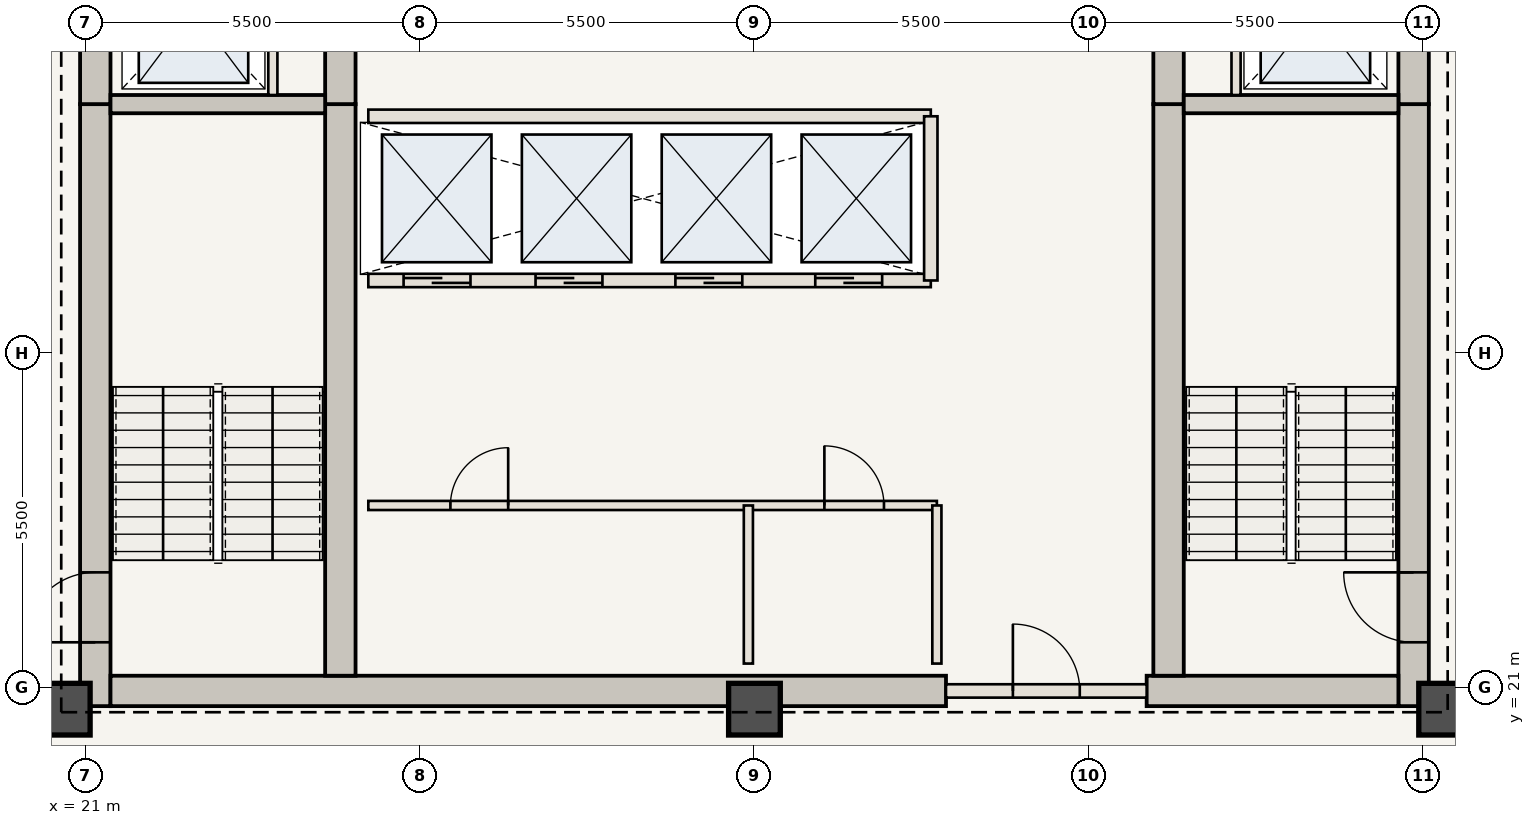
"""IFC4 building model, lengths in metres.
Left out: names, types, materials, properties, quantities, classifications, styles, units other than length and angle.
Written with IfcOpenShell. Run it as: python <this file> out.ifc"""

import sys

from ifc_helpers import new_model, si_unit, direction, frame, frame_2d, origin, origin_2d, place, context, subcontext, project, spatial, rectangle, extrude, element, fill, save


model = new_model("IFC4")
c1 = context("Model", 3, precision=1e-05, world=origin(), true_north=direction((0.0, 1.0)))
c2 = subcontext(c1, "Body", "Model", "MODEL_VIEW")
j1 = project(units=[si_unit("LENGTHUNIT", "METRE"), si_unit("PLANEANGLEUNIT", "RADIAN")], contexts=[c1])
p1 = place(None, origin())
s1 = spatial("IfcSite", under=j1, at=p1, CompositionType="ELEMENT")
p2 = place(p1, origin())
s2 = spatial("IfcBuilding", under=s1, at=p2, CompositionType="ELEMENT")
p3 = place(p2, frame((0.0, 0.0, 240.8)))
s3 = spatial("IfcBuildingStorey", under=s2, at=p3, CompositionType="ELEMENT", Elevation=240.8)
p4 = place(p3, frame((21.16, 20.7, 0.0), z_axis=(0.0, 0.0, 1.0), x_axis=(0.0, 1.0, 0.0)))
e1 = element("IfcWall", 1, at=p4, inside=s3, PredefinedType="SHEAR", context=c2, shape_type="SweptSolid", body=[
    extrude(rectangle(XDim=9.9, YDim=0.5, at=frame_2d((4.95, 0.0))), origin(), (0.0, 0.0, 1.0), 3.85),
])
p5 = place(p4, frame((1.05, 0.0, 0.0)))
e2 = element("IfcOpeningElement", 2, at=p5, cuts=e1, PredefinedType="OPENING", context=c2, shape_type="SweptSolid", body=[
    extrude(rectangle(XDim=1.15, YDim=2.15, at=frame_2d((0.575, 1.075))), frame((0.0, 0.26, 0.0), z_axis=(0.0, -1.0, 0.0), x_axis=(1.0, 0.0, 0.0)), (0.0, 0.0, 1.0), 0.52),
])
p6 = place(p3, frame((21.16, 30.6, 0.0), z_axis=(0.0, 0.0, 1.0), x_axis=(0.0, 1.0, 0.0)))
e3 = element("IfcWall", 3, at=p6, inside=s3, PredefinedType="SHEAR", context=c2, shape_type="SweptSolid", body=[
    extrude(rectangle(XDim=12.65, YDim=0.5, at=frame_2d((6.325, 0.0))), origin(), (0.0, 0.0, 1.0), 3.85),
])
p7 = place(p6, frame((4.2, 0.0, 0.0)))
e4 = element("IfcOpeningElement", 4, at=p7, cuts=e3, PredefinedType="OPENING", context=c2, shape_type="SweptSolid", body=[
    extrude(rectangle(XDim=1.1, YDim=2.15, at=frame_2d((0.55, 1.075))), frame((0.0, 0.26, 0.0), z_axis=(0.0, -1.0, 0.0), x_axis=(1.0, 0.0, 0.0)), (0.0, 0.0, 1.0), 0.52),
])
p8 = place(p6, frame((8.05, 0.0, 0.0)))
e5 = element("IfcOpeningElement", 5, at=p8, cuts=e3, PredefinedType="OPENING", context=c2, shape_type="SweptSolid", body=[
    extrude(rectangle(XDim=0.92, YDim=2.1, at=frame_2d((0.46, 1.05))), frame((0.0, 0.26, 0.0), z_axis=(0.0, -1.0, 0.0), x_axis=(1.0, 0.0, 0.0)), (0.0, 0.0, 1.0), 0.52),
])
p9 = place(p6, frame((9.45, 0.0, 0.0)))
e6 = element("IfcOpeningElement", 6, at=p9, cuts=e3, PredefinedType="OPENING", context=c2, shape_type="SweptSolid", body=[
    extrude(rectangle(XDim=0.88, YDim=2.1, at=frame_2d((0.44, 1.05))), frame((0.0, 0.26, 0.0), z_axis=(0.0, -1.0, 0.0), x_axis=(1.0, 0.0, 0.0)), (0.0, 0.0, 1.0), 0.52),
])
p10 = place(p6, frame((10.85, 0.0, 0.0)))
e7 = element("IfcOpeningElement", 7, at=p10, cuts=e3, PredefinedType="OPENING", context=c2, shape_type="SweptSolid", body=[
    extrude(rectangle(XDim=0.88, YDim=2.1, at=frame_2d((0.44, 1.05))), frame((0.0, 0.26, 0.0), z_axis=(0.0, -1.0, 0.0), x_axis=(1.0, 0.0, 0.0)), (0.0, 0.0, 1.0), 0.52),
])
p11 = place(p3, frame((42.84, 20.7, 0.0), z_axis=(0.0, 0.0, 1.0), x_axis=(0.0, 1.0, 0.0)))
e8 = element("IfcWall", 8, at=p11, inside=s3, PredefinedType="SHEAR", context=c2, shape_type="SweptSolid", body=[
    extrude(rectangle(XDim=9.9, YDim=0.5, at=frame_2d((4.95, 0.0))), origin(), (0.0, 0.0, 1.0), 3.85),
])
p12 = place(p11, frame((1.05, 0.0, 0.0)))
e9 = element("IfcOpeningElement", 9, at=p12, cuts=e8, PredefinedType="OPENING", context=c2, shape_type="SweptSolid", body=[
    extrude(rectangle(XDim=1.15, YDim=2.15, at=frame_2d((0.575, 1.075))), frame((0.0, 0.26, 0.0), z_axis=(0.0, -1.0, 0.0), x_axis=(1.0, 0.0, 0.0)), (0.0, 0.0, 1.0), 0.52),
])
p13 = place(p3, frame((42.84, 30.6, 0.0), z_axis=(0.0, 0.0, 1.0), x_axis=(0.0, 1.0, 0.0)))
e10 = element("IfcWall", 10, at=p13, inside=s3, PredefinedType="SHEAR", context=c2, shape_type="SweptSolid", body=[
    extrude(rectangle(XDim=12.65, YDim=0.5, at=frame_2d((6.325, 0.0))), origin(), (0.0, 0.0, 1.0), 3.85),
])
p14 = place(p13, frame((4.2, 0.0, 0.0)))
e11 = element("IfcOpeningElement", 11, at=p14, cuts=e10, PredefinedType="OPENING", context=c2, shape_type="SweptSolid", body=[
    extrude(rectangle(XDim=1.1, YDim=2.15, at=frame_2d((0.55, 1.075))), frame((0.0, 0.26, 0.0), z_axis=(0.0, -1.0, 0.0), x_axis=(1.0, 0.0, 0.0)), (0.0, 0.0, 1.0), 0.52),
])
p15 = place(p13, frame((9.2, 0.0, 0.0)))
e12 = element("IfcOpeningElement", 12, at=p15, cuts=e10, PredefinedType="OPENING", context=c2, shape_type="SweptSolid", body=[
    extrude(rectangle(XDim=0.92, YDim=2.1, at=frame_2d((0.46, 1.05))), frame((0.0, 0.26, 0.0), z_axis=(0.0, -1.0, 0.0), x_axis=(1.0, 0.0, 0.0)), (0.0, 0.0, 1.0), 0.52),
])
p16 = place(p3, frame((21.41, 20.95, 0.0), z_axis=(0.0, 0.0, 1.0), x_axis=(1.0, 0.0, 0.0)))
e13 = element("IfcWall", 13, at=p16, inside=s3, PredefinedType="SHEAR", context=c2, shape_type="SweptSolid", body=[
    extrude(rectangle(XDim=13.74, YDim=0.5, at=frame_2d((6.87, 0.0))), origin(), (0.0, 0.0, 1.0), 3.85),
])
p17 = place(p3, frame((38.45, 20.95, 0.0), z_axis=(0.0, 0.0, 1.0), x_axis=(1.0, 0.0, 0.0)))
e14 = element("IfcWall", 14, at=p17, inside=s3, PredefinedType="SHEAR", context=c2, shape_type="SweptSolid", body=[
    extrude(rectangle(XDim=4.14, YDim=0.5, at=frame_2d((2.07, 0.0))), origin(), (0.0, 0.0, 1.0), 3.85),
])
p18 = place(p3, frame((25.19, 21.2, 0.0), z_axis=(0.0, 0.0, 1.0), x_axis=(0.0, 1.0, 0.0)))
e15 = element("IfcWall", 15, at=p18, inside=s3, PredefinedType="SHEAR", context=c2, shape_type="SweptSolid", body=[
    extrude(rectangle(XDim=9.4, YDim=0.5, at=frame_2d((4.7, 0.0))), origin(), (0.0, 0.0, 1.0), 3.85),
])
p19 = place(p3, frame((25.19, 30.6, 0.0), z_axis=(0.0, 0.0, 1.0), x_axis=(0.0, 1.0, 0.0)))
e16 = element("IfcWall", 16, at=p19, inside=s3, PredefinedType="SHEAR", context=c2, shape_type="SweptSolid", body=[
    extrude(rectangle(XDim=12.15, YDim=0.5, at=frame_2d((6.075, 0.0))), origin(), (0.0, 0.0, 1.0), 3.85),
])
p20 = place(p19, frame((6.25, 0.0, 0.0)))
e17 = element("IfcOpeningElement", 17, at=p20, cuts=e16, PredefinedType="OPENING", context=c2, shape_type="SweptSolid", body=[
    extrude(rectangle(XDim=1.1, YDim=2.15, at=frame_2d((0.55, 1.075))), frame((0.0, 0.26, 0.0), z_axis=(0.0, -1.0, 0.0), x_axis=(1.0, 0.0, 0.0)), (0.0, 0.0, 1.0), 0.52),
])
p21 = place(p3, frame((38.81, 21.2, 0.0), z_axis=(0.0, 0.0, 1.0), x_axis=(0.0, 1.0, 0.0)))
e18 = element("IfcWall", 18, at=p21, inside=s3, PredefinedType="SHEAR", context=c2, shape_type="SweptSolid", body=[
    extrude(rectangle(XDim=9.4, YDim=0.5, at=frame_2d((4.7, 0.0))), origin(), (0.0, 0.0, 1.0), 3.85),
])
p22 = place(p3, frame((38.81, 30.6, 0.0), z_axis=(0.0, 0.0, 1.0), x_axis=(0.0, 1.0, 0.0)))
e19 = element("IfcWall", 19, at=p22, inside=s3, PredefinedType="SHEAR", context=c2, shape_type="SweptSolid", body=[
    extrude(rectangle(XDim=12.15, YDim=0.5, at=frame_2d((6.075, 0.0))), origin(), (0.0, 0.0, 1.0), 3.85),
])
for number, where, z_axis, x_axis in (
    (20, (20.65, 20.65, 0.0), (0.0, 0.0, 1.0), (1.0, 0.0, 0.0)),
    (21, (32.0, 20.65, 0.0), (0.0, 0.0, 1.0), (1.0, 0.0, 0.0)),
    (22, (43.35, 20.65, 0.0), (0.0, 0.0, 1.0), (1.0, 0.0, 0.0)),
):
    element("IfcColumn", number, at=place(p3, frame(where, z_axis=z_axis, x_axis=x_axis)), inside=s3, PredefinedType="COLUMN", context=c2, shape_type="SweptSolid", body=[
        extrude(rectangle(XDim=0.85, YDim=0.85, at=origin_2d()), origin(), (0.0, 0.0, 1.0), 3.85),
    ])
for number, where, z_axis, x_axis in (
    (23, (21.41, 30.6, 0.0), (0.0, 0.0, 1.0), (1.0, 0.0, 0.0)),
    (24, (39.06, 30.6, 0.0), (0.0, 0.0, 1.0), (1.0, 0.0, 0.0)),
):
    element("IfcWall", number, at=place(p3, frame(where, z_axis=z_axis, x_axis=x_axis)), inside=s3, PredefinedType="SHEAR", context=c2, shape_type="SweptSolid", body=[
        extrude(rectangle(XDim=3.53, YDim=0.3, at=frame_2d((1.765, 0.0))), origin(), (0.0, 0.0, 1.0), 3.685),
    ])
for number, where, z_axis, x_axis in (
    (25, (24.08, 30.75, 0.0), (0.0, 0.0, 1.0), (0.0, 1.0, 0.0)),
    (26, (39.92, 30.75, 0.0), (0.0, 0.0, 1.0), (0.0, 1.0, 0.0)),
):
    element("IfcWall", number, at=place(p3, frame(where, z_axis=z_axis, x_axis=x_axis)), inside=s3, PredefinedType="STANDARD", context=c2, shape_type="SweptSolid", body=[
        extrude(rectangle(XDim=2.65, YDim=0.15, at=frame_2d((1.325, 0.0))), origin(), (0.0, 0.0, 1.0), 3.685),
    ])
p23 = place(p3, frame((35.15, 20.95, 0.0), z_axis=(0.0, 0.0, 1.0), x_axis=(1.0, 0.0, 0.0)))
e27 = element("IfcWall", 27, at=p23, inside=s3, PredefinedType="STANDARD", context=c2, shape_type="SweptSolid", body=[
    extrude(rectangle(XDim=3.3, YDim=0.22, at=frame_2d((1.65, 0.0))), origin(), (0.0, 0.0, 1.0), 3.685),
])
p24 = place(p23, frame((1.1, 0.0, 0.0)))
e28 = element("IfcOpeningElement", 28, at=p24, cuts=e27, PredefinedType="OPENING", context=c2, shape_type="SweptSolid", body=[
    extrude(rectangle(XDim=1.1, YDim=2.15, at=frame_2d((0.55, 1.075))), frame((0.0, 0.12, 0.0), z_axis=(0.0, -1.0, 0.0), x_axis=(1.0, 0.0, 0.0)), (0.0, 0.0, 1.0), 0.24),
])
p25 = place(p3, frame((25.65, 24.0, 0.0), z_axis=(0.0, 0.0, 1.0), x_axis=(1.0, 0.0, 0.0)))
e29 = element("IfcWall", 29, at=p25, inside=s3, PredefinedType="STANDARD", context=c2, shape_type="SweptSolid", body=[
    extrude(rectangle(XDim=9.35, YDim=0.15, at=frame_2d((4.675, 0.0))), origin(), (0.0, 0.0, 1.0), 3.685),
])
p26 = place(p25, frame((1.35, 0.0, 0.0)))
e30 = element("IfcOpeningElement", 30, at=p26, cuts=e29, PredefinedType="OPENING", context=c2, shape_type="SweptSolid", body=[
    extrude(rectangle(XDim=0.95, YDim=2.15, at=frame_2d((0.475, 1.075))), frame((0.0, 0.085, 0.0), z_axis=(0.0, -1.0, 0.0), x_axis=(1.0, 0.0, 0.0)), (0.0, 0.0, 1.0), 0.17),
])
p27 = place(p25, frame((7.5, 0.0, 0.0)))
e31 = element("IfcOpeningElement", 31, at=p27, cuts=e29, PredefinedType="OPENING", context=c2, shape_type="SweptSolid", body=[
    extrude(rectangle(XDim=0.98, YDim=2.2, at=frame_2d((0.49, 1.1))), frame((0.0, 0.085, 0.0), z_axis=(0.0, -1.0, 0.0), x_axis=(1.0, 0.0, 0.0)), (0.0, 0.0, 1.0), 0.17),
])
for number, where, z_axis, x_axis in (
    (32, (31.9, 21.4, 0.0), (0.0, 0.0, 1.0), (0.0, 1.0, 0.0)),
    (33, (35.0, 21.4, 0.0), (0.0, 0.0, 1.0), (0.0, 1.0, 0.0)),
):
    element("IfcWall", number, at=place(p3, frame(where, z_axis=z_axis, x_axis=x_axis)), inside=s3, PredefinedType="STANDARD", context=c2, shape_type="SweptSolid", body=[
        extrude(rectangle(XDim=2.6, YDim=0.15, at=frame_2d((1.3, 0.0))), origin(), (0.0, 0.0, 1.0), 3.685),
    ])
p28 = place(p3, frame((25.65, 27.7, 0.0), z_axis=(0.0, 0.0, 1.0), x_axis=(1.0, 0.0, 0.0)))
e34 = element("IfcWall", 34, at=p28, inside=s3, PredefinedType="STANDARD", context=c2, shape_type="SweptSolid", body=[
    extrude(rectangle(XDim=9.25, YDim=0.22, at=frame_2d((4.625, 0.0))), origin(), (0.0, 0.0, 1.0), 3.685),
])
p29 = place(p28, frame((0.58, 0.0, 0.0)))
e35 = element("IfcOpeningElement", 35, at=p29, cuts=e34, PredefinedType="OPENING", context=c2, shape_type="SweptSolid", body=[
    extrude(rectangle(XDim=1.1, YDim=2.15, at=frame_2d((0.55, 1.075))), frame((0.0, 0.12, 0.0), z_axis=(0.0, -1.0, 0.0), x_axis=(1.0, 0.0, 0.0)), (0.0, 0.0, 1.0), 0.24),
])
p30 = place(p28, frame((2.75, 0.0, 0.0)))
e36 = element("IfcOpeningElement", 36, at=p30, cuts=e34, PredefinedType="OPENING", context=c2, shape_type="SweptSolid", body=[
    extrude(rectangle(XDim=1.1, YDim=2.15, at=frame_2d((0.55, 1.075))), frame((0.0, 0.12, 0.0), z_axis=(0.0, -1.0, 0.0), x_axis=(1.0, 0.0, 0.0)), (0.0, 0.0, 1.0), 0.24),
])
p31 = place(p28, frame((5.05, 0.0, 0.0)))
e37 = element("IfcOpeningElement", 37, at=p31, cuts=e34, PredefinedType="OPENING", context=c2, shape_type="SweptSolid", body=[
    extrude(rectangle(XDim=1.1, YDim=2.15, at=frame_2d((0.55, 1.075))), frame((0.0, 0.12, 0.0), z_axis=(0.0, -1.0, 0.0), x_axis=(1.0, 0.0, 0.0)), (0.0, 0.0, 1.0), 0.24),
])
p32 = place(p28, frame((7.35, 0.0, 0.0)))
e38 = element("IfcOpeningElement", 38, at=p32, cuts=e34, PredefinedType="OPENING", context=c2, shape_type="SweptSolid", body=[
    extrude(rectangle(XDim=1.1, YDim=2.15, at=frame_2d((0.55, 1.075))), frame((0.0, 0.12, 0.0), z_axis=(0.0, -1.0, 0.0), x_axis=(1.0, 0.0, 0.0)), (0.0, 0.0, 1.0), 0.24),
])
p33 = place(p3, frame((25.65, 30.4, 0.0), z_axis=(0.0, 0.0, 1.0), x_axis=(1.0, 0.0, 0.0)))
e39 = element("IfcWall", 39, at=p33, inside=s3, PredefinedType="STANDARD", context=c2, shape_type="SweptSolid", body=[
    extrude(rectangle(XDim=9.25, YDim=0.22, at=frame_2d((4.625, 0.0))), origin(), (0.0, 0.0, 1.0), 3.685),
])
p34 = place(p3, frame((34.9, 27.7, 0.0), z_axis=(0.0, 0.0, 1.0), x_axis=(0.0, 1.0, 0.0)))
e40 = element("IfcWall", 40, at=p34, inside=s3, PredefinedType="STANDARD", context=c2, shape_type="SweptSolid", body=[
    extrude(rectangle(XDim=2.7, YDim=0.22, at=frame_2d((1.35, 0.0))), origin(), (0.0, 0.0, 1.0), 3.685),
])
p35 = place(p5, origin())
e41 = element("IfcDoor", 41, at=p35, inside=s3, OperationType="SINGLE_SWING_LEFT", PredefinedType="DOOR", context=c2, shape_type="SweptSolid", body=[
    extrude(rectangle(XDim=1.15, YDim=2.15, at=frame_2d((0.575, 1.075))), frame((0.0, 0.025, 0.0), z_axis=(0.0, -1.0, 0.0), x_axis=(1.0, 0.0, 0.0)), (0.0, 0.0, 1.0), 0.05),
])
fill(e2, e41)
p36 = place(p12, origin())
e42 = element("IfcDoor", 42, at=p36, inside=s3, OperationType="SINGLE_SWING_RIGHT", PredefinedType="DOOR", context=c2, shape_type="SweptSolid", body=[
    extrude(rectangle(XDim=1.15, YDim=2.15, at=frame_2d((0.575, 1.075))), frame((0.0, 0.025, 0.0), z_axis=(0.0, -1.0, 0.0), x_axis=(1.0, 0.0, 0.0)), (0.0, 0.0, 1.0), 0.05),
])
fill(e9, e42)
p37 = place(p24, origin())
e43 = element("IfcDoor", 43, at=p37, inside=s3, OperationType="SINGLE_SWING_LEFT", PredefinedType="DOOR", context=c2, shape_type="SweptSolid", body=[
    extrude(rectangle(XDim=1.1, YDim=2.15, at=frame_2d((0.55, 1.075))), frame((0.0, 0.025, 0.0), z_axis=(0.0, -1.0, 0.0), x_axis=(1.0, 0.0, 0.0)), (0.0, 0.0, 1.0), 0.05),
])
fill(e28, e43)
p38 = place(p26, origin())
e44 = element("IfcDoor", 44, at=p38, inside=s3, OperationType="SINGLE_SWING_RIGHT", PredefinedType="DOOR", context=c2, shape_type="SweptSolid", body=[
    extrude(rectangle(XDim=0.95, YDim=2.15, at=frame_2d((0.475, 1.075))), frame((0.0, 0.025, 0.0), z_axis=(0.0, -1.0, 0.0), x_axis=(1.0, 0.0, 0.0)), (0.0, 0.0, 1.0), 0.05),
])
fill(e30, e44)
p39 = place(p27, origin())
e45 = element("IfcDoor", 45, at=p39, inside=s3, OperationType="SINGLE_SWING_LEFT", PredefinedType="DOOR", context=c2, shape_type="SweptSolid", body=[
    extrude(rectangle(XDim=0.98, YDim=2.2, at=frame_2d((0.49, 1.1))), frame((0.0, 0.025, 0.0), z_axis=(0.0, -1.0, 0.0), x_axis=(1.0, 0.0, 0.0)), (0.0, 0.0, 1.0), 0.05),
])
fill(e31, e45)
p40 = place(p29, origin())
e46 = element("IfcDoor", 46, at=p40, inside=s3, OperationType="DOUBLE_DOOR_SLIDING", PredefinedType="DOOR", context=c2, shape_type="SweptSolid", body=[
    extrude(rectangle(XDim=1.1, YDim=2.15, at=frame_2d((0.55, 1.075))), frame((0.0, 0.025, 0.0), z_axis=(0.0, -1.0, 0.0), x_axis=(1.0, 0.0, 0.0)), (0.0, 0.0, 1.0), 0.05),
])
fill(e35, e46)
p41 = place(p30, origin())
e47 = element("IfcDoor", 47, at=p41, inside=s3, OperationType="DOUBLE_DOOR_SLIDING", PredefinedType="DOOR", context=c2, shape_type="SweptSolid", body=[
    extrude(rectangle(XDim=1.1, YDim=2.15, at=frame_2d((0.55, 1.075))), frame((0.0, 0.025, 0.0), z_axis=(0.0, -1.0, 0.0), x_axis=(1.0, 0.0, 0.0)), (0.0, 0.0, 1.0), 0.05),
])
fill(e36, e47)
p42 = place(p31, origin())
e48 = element("IfcDoor", 48, at=p42, inside=s3, OperationType="DOUBLE_DOOR_SLIDING", PredefinedType="DOOR", context=c2, shape_type="SweptSolid", body=[
    extrude(rectangle(XDim=1.1, YDim=2.15, at=frame_2d((0.55, 1.075))), frame((0.0, 0.025, 0.0), z_axis=(0.0, -1.0, 0.0), x_axis=(1.0, 0.0, 0.0)), (0.0, 0.0, 1.0), 0.05),
])
fill(e37, e48)
p43 = place(p32, origin())
e49 = element("IfcDoor", 49, at=p43, inside=s3, OperationType="DOUBLE_DOOR_SLIDING", PredefinedType="DOOR", context=c2, shape_type="SweptSolid", body=[
    extrude(rectangle(XDim=1.1, YDim=2.15, at=frame_2d((0.55, 1.075))), frame((0.0, 0.025, 0.0), z_axis=(0.0, -1.0, 0.0), x_axis=(1.0, 0.0, 0.0)), (0.0, 0.0, 1.0), 0.05),
])
fill(e38, e49)
save(model, sys.argv[1])
